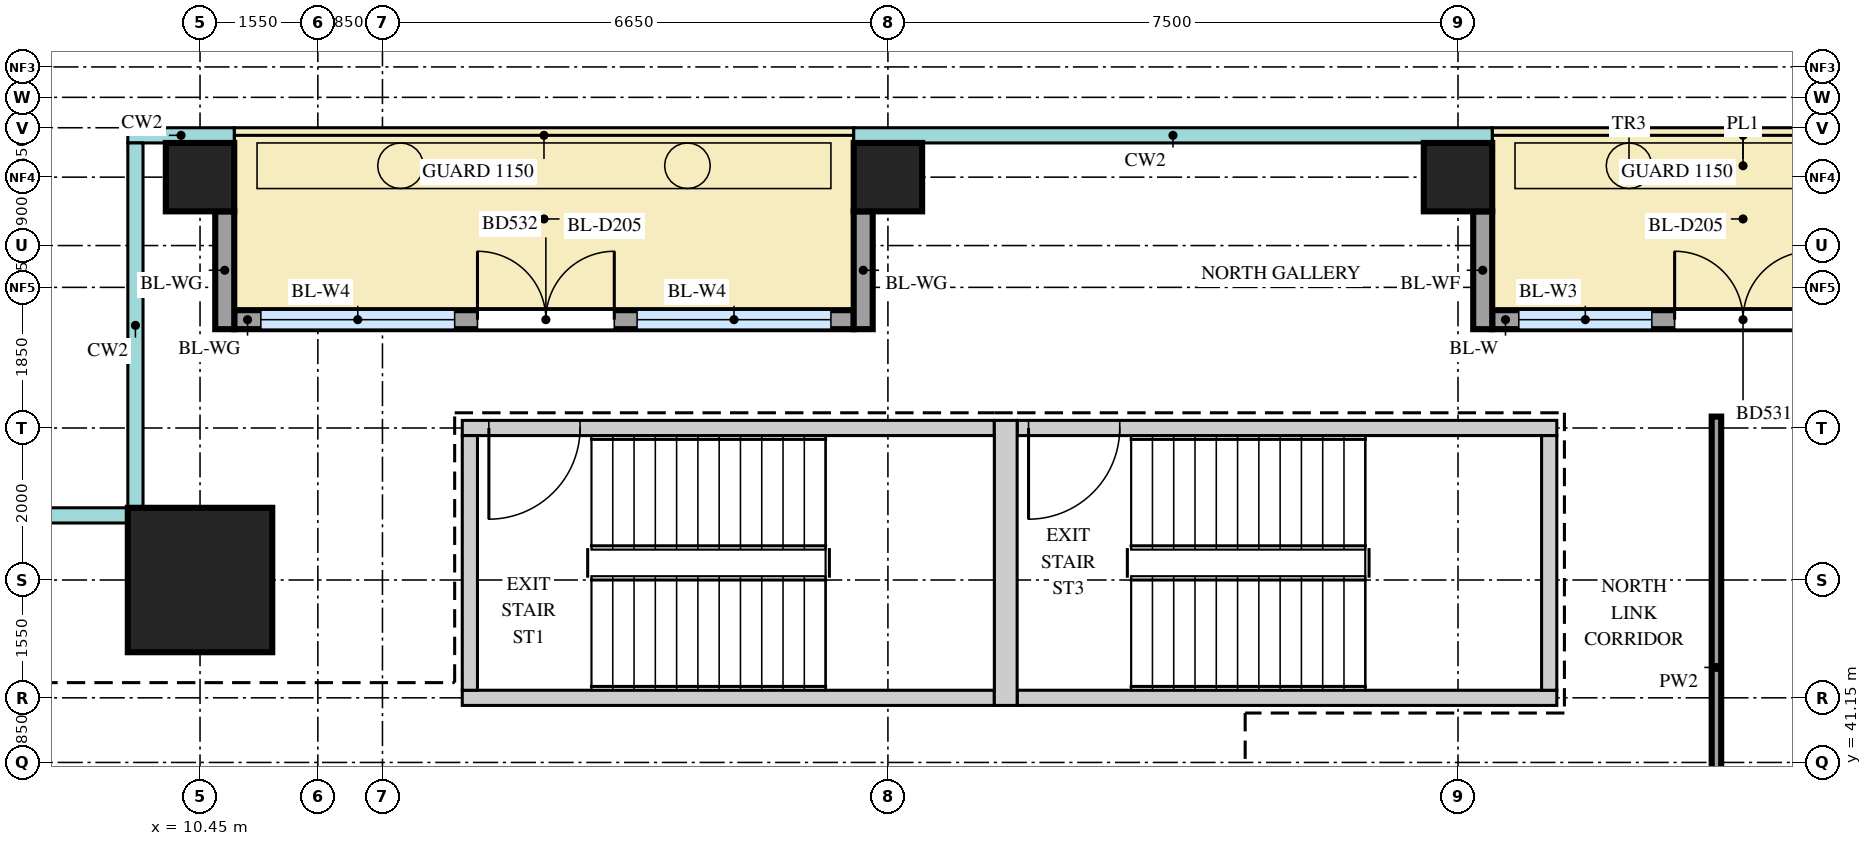
"""IFC4 building model, lengths in metres.
Left out: names, types, materials, properties, quantities, classifications, styles, units other than length and angle.
Written with IfcOpenShell. Run it as: python <this file> out.ifc"""

import sys

from ifc_helpers import new_model, si_unit, direction, frame, frame_2d, origin, origin_2d, place, context, subcontext, project, spatial, rectangle, extrude, source, transform, mapped, element, fill, save


model = new_model("IFC4")
c1 = context("Model", 3, precision=1e-05, world=origin(), true_north=direction((0.0, 1.0)))
c2 = subcontext(c1, "Body", "Model", "MODEL_VIEW")
j1 = project(units=[si_unit("LENGTHUNIT", "METRE"), si_unit("PLANEANGLEUNIT", "RADIAN")], contexts=[c1])
p1 = place(None, origin())
s1 = spatial("IfcSite", under=j1, at=p1, CompositionType="ELEMENT")
p2 = place(p1, origin())
s2 = spatial("IfcBuilding", under=s1, at=p2, CompositionType="ELEMENT")
p3 = place(p2, frame((0.0, 0.0, 238.2)))
s3 = spatial("IfcBuildingStorey", under=s2, at=p3, CompositionType="ELEMENT", Elevation=238.2)
m1 = source(origin(), c2, "Body", "SweptSolid", [
    extrude(rectangle(XDim=7.0, YDim=0.2, at=frame_2d((3.5, 0.0))), origin(), (0.0, 0.0, 1.0), 3.75),
])
p4 = place(p3, frame((13.9, 45.55, 0.0), z_axis=(0.0, 0.0, 1.0), x_axis=(1.0, 0.0, 0.0)))
e1 = element("IfcWall", 1, at=p4, inside=s3, PredefinedType="SHEAR", context=c2, shape_type="MappedRepresentation", body=[
    mapped(m1, transform((0.0, 0.0, 0.0))),
])
m2 = source(origin(), c2, "Body", "SweptSolid", [
    extrude(rectangle(XDim=1.2, YDim=2.1, at=frame_2d((0.6, 1.05))), frame((0.0, 0.11, 0.0), z_axis=(0.0, -1.0, 0.0), x_axis=(1.0, 0.0, 0.0)), (0.0, 0.0, 1.0), 0.22),
])
p5 = place(p4, frame((0.35, 0.0, 0.0)))
e2 = element("IfcOpeningElement", 2, at=p5, cuts=e1, PredefinedType="OPENING", context=c2, shape_type="MappedRepresentation", body=[
    mapped(m2, transform((0.0, 0.0, 0.0))),
])
p6 = place(p3, frame((13.9, 42.0, 0.0), z_axis=(0.0, 0.0, 1.0), x_axis=(1.0, 0.0, 0.0)))
e3 = element("IfcWall", 3, at=p6, inside=s3, PredefinedType="SHEAR", context=c2, shape_type="MappedRepresentation", body=[
    mapped(m1, transform((0.0, 0.0, 0.0))),
])
m3 = source(origin(), c2, "Body", "SweptSolid", [
    extrude(rectangle(XDim=7.1, YDim=0.2, at=frame_2d((3.55, 0.0))), origin(), (0.0, 0.0, 1.0), 3.75),
])
p7 = place(p3, frame((21.2, 45.55, 0.0), z_axis=(0.0, 0.0, 1.0), x_axis=(1.0, 0.0, 0.0)))
e4 = element("IfcWall", 4, at=p7, inside=s3, PredefinedType="SHEAR", context=c2, shape_type="MappedRepresentation", body=[
    mapped(m3, transform((0.0, 0.0, 0.0))),
])
p8 = place(p7, frame((0.15, 0.0, 0.0)))
e5 = element("IfcOpeningElement", 5, at=p8, cuts=e4, PredefinedType="OPENING", context=c2, shape_type="MappedRepresentation", body=[
    mapped(m2, transform((0.0, 0.0, 0.0))),
])
p9 = place(p3, frame((21.2, 42.0, 0.0), z_axis=(0.0, 0.0, 1.0), x_axis=(1.0, 0.0, 0.0)))
e6 = element("IfcWall", 6, at=p9, inside=s3, PredefinedType="SHEAR", context=c2, shape_type="MappedRepresentation", body=[
    mapped(m3, transform((0.0, 0.0, 0.0))),
])
m4 = source(origin(), c2, "Body", "SweptSolid", [
    extrude(rectangle(XDim=3.75, YDim=0.3, at=frame_2d((1.875, 0.0))), origin(), (0.0, 0.0, 1.0), 3.75),
])
p10 = place(p3, frame((21.05, 41.9, 0.0), z_axis=(0.0, 0.0, 1.0), x_axis=(0.0, 1.0, 0.0)))
e7 = element("IfcWall", 7, at=p10, inside=s3, PredefinedType="SHEAR", context=c2, shape_type="MappedRepresentation", body=[
    mapped(m4, transform((0.0, 0.0, 0.0))),
])
m5 = source(origin(), c2, "Body", "SweptSolid", [
    extrude(rectangle(XDim=3.35, YDim=0.2, at=frame_2d((1.675, 0.0))), origin(), (0.0, 0.0, 1.0), 3.75),
])
for number, where, z_axis, x_axis in (
    (8, (14.0, 42.1, 0.0), (0.0, 0.0, 1.0), (0.0, 1.0, 0.0)),
    (9, (28.2, 42.1, 0.0), (0.0, 0.0, 1.0), (0.0, 1.0, 0.0)),
):
    element("IfcWall", number, at=place(p3, frame(where, z_axis=z_axis, x_axis=x_axis)), inside=s3, PredefinedType="SHEAR", context=c2, shape_type="MappedRepresentation", body=[
        mapped(m5, transform((0.0, 0.0, 0.0))),
    ])
m6 = source(origin(), c2, "Body", "SweptSolid", [
    extrude(rectangle(XDim=1.9, YDim=1.9, at=origin_2d()), origin(), (0.0, 0.0, 1.0), 4.0),
])
p11 = place(p3, frame((10.45, 43.55, 0.0), z_axis=(0.0, 0.0, 1.0), x_axis=(1.0, 0.0, 0.0)))
e10 = element("IfcColumn", 10, at=p11, inside=s3, PredefinedType="COLUMN", context=c2, shape_type="MappedRepresentation", body=[
    mapped(m6, transform((0.0, 0.0, 0.0))),
])
m7 = source(origin(), c2, "Body", "SweptSolid", [
    extrude(rectangle(XDim=0.9, YDim=0.9, at=origin_2d()), origin(), (0.0, 0.0, 1.0), 3.75),
])
for number, where, z_axis, x_axis in (
    (11, (10.45, 48.85, 0.0), (0.0, 0.0, 1.0), (1.0, 0.0, 0.0)),
    (12, (19.5, 48.85, 0.0), (0.0, 0.0, 1.0), (1.0, 0.0, 0.0)),
    (13, (27.0, 48.85, 0.0), (0.0, 0.0, 1.0), (1.0, 0.0, 0.0)),
):
    element("IfcColumn", number, at=place(p3, frame(where, z_axis=z_axis, x_axis=x_axis)), inside=s3, PredefinedType="COLUMN", context=c2, shape_type="MappedRepresentation", body=[
        mapped(m7, transform((0.0, 0.0, 0.0))),
    ])
m8 = source(origin(), c2, "Body", "SweptSolid", [
    extrude(rectangle(XDim=6.6, YDim=0.25, at=frame_2d((3.3, 0.0))), origin(), (0.0, 0.0, 1.0), 3.75),
])
p12 = place(p3, frame((27.45, 46.975, 0.0), z_axis=(0.0, 0.0, 1.0), x_axis=(1.0, 0.0, 0.0)))
e14 = element("IfcWall", 14, at=p12, inside=s3, PredefinedType="SOLIDWALL", context=c2, shape_type="MappedRepresentation", body=[
    mapped(m8, transform((0.0, 0.0, 0.0))),
])
m9 = source(origin(), c2, "Body", "SweptSolid", [
    extrude(rectangle(XDim=1.75, YDim=2.4, at=frame_2d((0.875, 1.2))), frame((0.0, 0.135, 0.0), z_axis=(0.0, -1.0, 0.0), x_axis=(1.0, 0.0, 0.0)), (0.0, 0.0, 1.0), 0.27),
])
p13 = place(p12, frame((0.35, 0.0, 0.0)))
e15 = element("IfcOpeningElement", 15, at=p13, cuts=e14, PredefinedType="OPENING", context=c2, shape_type="MappedRepresentation", body=[
    mapped(m9, transform((0.0, 0.0, 0.0))),
])
p14 = place(p12, frame((4.5, 0.0, 0.0)))
e16 = element("IfcOpeningElement", 16, at=p14, cuts=e14, PredefinedType="OPENING", context=c2, shape_type="MappedRepresentation", body=[
    mapped(m9, transform((0.0, 0.0, 0.0))),
])
m10 = source(origin(), c2, "Body", "SweptSolid", [
    extrude(rectangle(XDim=1.8, YDim=2.4, at=frame_2d((0.9, 1.2))), frame((0.0, 0.135, 0.0), z_axis=(0.0, -1.0, 0.0), x_axis=(1.0, 0.0, 0.0)), (0.0, 0.0, 1.0), 0.27),
])
p15 = place(p12, frame((2.4, 0.0, 0.0)))
e17 = element("IfcOpeningElement", 17, at=p15, cuts=e14, PredefinedType="OPENING", context=c2, shape_type="MappedRepresentation", body=[
    mapped(m10, transform((0.0, 0.0, 0.0))),
])
m11 = source(origin(), c2, "Body", "SweptSolid", [
    extrude(rectangle(XDim=1.55, YDim=0.25, at=frame_2d((0.775, 0.0))), origin(), (0.0, 0.0, 1.0), 3.45),
])
p16 = place(p3, frame((27.325, 48.4, 0.0), z_axis=(0.0, 0.0, 1.0), x_axis=(0.0, -1.0, 0.0)))
e18 = element("IfcWall", 18, at=p16, inside=s3, PredefinedType="SOLIDWALL", context=c2, shape_type="MappedRepresentation", body=[
    mapped(m11, transform((0.0, 0.0, 0.0))),
])
m12 = source(origin(), c2, "Body", "SweptSolid", [
    extrude(rectangle(XDim=8.15, YDim=0.25, at=frame_2d((4.075, 0.0))), origin(), (0.0, 0.0, 1.0), 3.35),
])
p17 = place(p3, frame((10.9, 46.975, 0.0), z_axis=(0.0, 0.0, 1.0), x_axis=(1.0, 0.0, 0.0)))
e19 = element("IfcWall", 19, at=p17, inside=s3, PredefinedType="SOLIDWALL", context=c2, shape_type="MappedRepresentation", body=[
    mapped(m12, transform((0.0, 0.0, 0.0))),
])
m13 = source(origin(), c2, "Body", "SweptSolid", [
    extrude(rectangle(XDim=2.55, YDim=2.4, at=frame_2d((1.275, 1.2))), frame((0.0, 0.135, 0.0), z_axis=(0.0, -1.0, 0.0), x_axis=(1.0, 0.0, 0.0)), (0.0, 0.0, 1.0), 0.27),
])
p18 = place(p17, frame((0.35, 0.0, 0.0)))
e20 = element("IfcOpeningElement", 20, at=p18, cuts=e19, PredefinedType="OPENING", context=c2, shape_type="MappedRepresentation", body=[
    mapped(m13, transform((0.0, 0.0, 0.0))),
])
p19 = place(p17, frame((5.3, 0.0, 0.0)))
e21 = element("IfcOpeningElement", 21, at=p19, cuts=e19, PredefinedType="OPENING", context=c2, shape_type="MappedRepresentation", body=[
    mapped(m13, transform((0.0, 0.0, 0.0))),
])
p20 = place(p17, frame((3.2, 0.0, 0.0)))
e22 = element("IfcOpeningElement", 22, at=p20, cuts=e19, PredefinedType="OPENING", context=c2, shape_type="MappedRepresentation", body=[
    mapped(m10, transform((0.0, 0.0, 0.0))),
])
m14 = source(origin(), c2, "Body", "SweptSolid", [
    extrude(rectangle(XDim=1.55, YDim=0.25, at=frame_2d((0.775, 0.0))), origin(), (0.0, 0.0, 1.0), 3.35),
])
for number, where, z_axis, x_axis in (
    (23, (10.775, 48.4, 0.0), (0.0, 0.0, 1.0), (0.0, -1.0, 0.0)),
    (24, (19.175, 48.4, 0.0), (0.0, 0.0, 1.0), (0.0, -1.0, 0.0)),
):
    element("IfcWall", number, at=place(p3, frame(where, z_axis=z_axis, x_axis=x_axis)), inside=s3, PredefinedType="SOLIDWALL", context=c2, shape_type="MappedRepresentation", body=[
        mapped(m14, transform((0.0, 0.0, 0.0))),
    ])
m15 = source(origin(), c2, "Body", "SweptSolid", [
    extrude(rectangle(XDim=6.6, YDim=0.125, at=frame_2d((3.3, 0.0))), origin(), (0.0, 0.0, 1.0), 3.8),
])
p21 = place(p3, frame((30.4, 39.1, 0.0), z_axis=(0.0, 0.0, 1.0), x_axis=(0.0, 1.0, 0.0)))
e25 = element("IfcWall", 25, at=p21, inside=s3, PredefinedType="PARTITIONING", context=c2, shape_type="MappedRepresentation", body=[
    mapped(m15, transform((0.0, 0.0, 0.0))),
])
m16 = source(origin(), c2, "Body", "SweptSolid", [
    extrude(rectangle(XDim=1.75, YDim=2.4, at=frame_2d((0.875, 1.2))), frame((0.0, 0.03, 0.0), z_axis=(0.0, -1.0, 0.0), x_axis=(1.0, 0.0, 0.0)), (0.0, 0.0, 1.0), 0.06),
])
p22 = place(p13, origin())
e26 = element("IfcWindow", 26, at=p22, inside=s3, PartitioningType="SINGLE_PANEL", PredefinedType="WINDOW", context=c2, shape_type="MappedRepresentation", body=[
    mapped(m16, transform((0.0, 0.0, 0.0))),
])
fill(e15, e26)
m17 = source(origin(), c2, "Body", "SweptSolid", [
    extrude(rectangle(XDim=1.8, YDim=2.4, at=frame_2d((0.9, 1.2))), frame((0.0, 0.025, 0.0), z_axis=(0.0, -1.0, 0.0), x_axis=(1.0, 0.0, 0.0)), (0.0, 0.0, 1.0), 0.05),
])
p23 = place(p15, origin())
e27 = element("IfcDoor", 27, at=p23, inside=s3, OperationType="DOUBLE_DOOR_DOUBLE_SWING", PredefinedType="DOOR", context=c2, shape_type="MappedRepresentation", body=[
    mapped(m17, transform((0.0, 0.0, 0.0))),
])
fill(e17, e27)
m18 = source(origin(), c2, "Body", "SweptSolid", [
    extrude(rectangle(XDim=2.55, YDim=2.4, at=frame_2d((1.275, 1.2))), frame((0.0, 0.03, 0.0), z_axis=(0.0, -1.0, 0.0), x_axis=(1.0, 0.0, 0.0)), (0.0, 0.0, 1.0), 0.06),
])
p24 = place(p18, origin())
e28 = element("IfcWindow", 28, at=p24, inside=s3, PartitioningType="SINGLE_PANEL", PredefinedType="WINDOW", context=c2, shape_type="MappedRepresentation", body=[
    mapped(m18, transform((0.0, 0.0, 0.0))),
])
fill(e20, e28)
p25 = place(p19, origin())
e29 = element("IfcWindow", 29, at=p25, inside=s3, PartitioningType="SINGLE_PANEL", PredefinedType="WINDOW", context=c2, shape_type="MappedRepresentation", body=[
    mapped(m18, transform((0.0, 0.0, 0.0))),
])
fill(e21, e29)
p26 = place(p20, origin())
e30 = element("IfcDoor", 30, at=p26, inside=s3, OperationType="DOUBLE_DOOR_DOUBLE_SWING", PredefinedType="DOOR", context=c2, shape_type="MappedRepresentation", body=[
    mapped(m17, transform((0.0, 0.0, 0.0))),
])
fill(e22, e30)
m19 = source(origin(), c2, "Body", "SweptSolid", [
    extrude(rectangle(XDim=1.2, YDim=2.1, at=frame_2d((0.6, 1.05))), frame((0.0, 0.025, 0.0), z_axis=(0.0, -1.0, 0.0), x_axis=(1.0, 0.0, 0.0)), (0.0, 0.0, 1.0), 0.05),
])
p27 = place(p5, origin())
e31 = element("IfcDoor", 31, at=p27, inside=s3, OperationType="SINGLE_SWING_LEFT", PredefinedType="DOOR", context=c2, shape_type="MappedRepresentation", body=[
    mapped(m19, transform((0.0, 0.0, 0.0))),
])
fill(e2, e31)
p28 = place(p8, origin())
e32 = element("IfcDoor", 32, at=p28, inside=s3, OperationType="SINGLE_SWING_LEFT", PredefinedType="DOOR", context=c2, shape_type="MappedRepresentation", body=[
    mapped(m19, transform((0.0, 0.0, 0.0))),
])
fill(e5, e32)
save(model, sys.argv[1])
